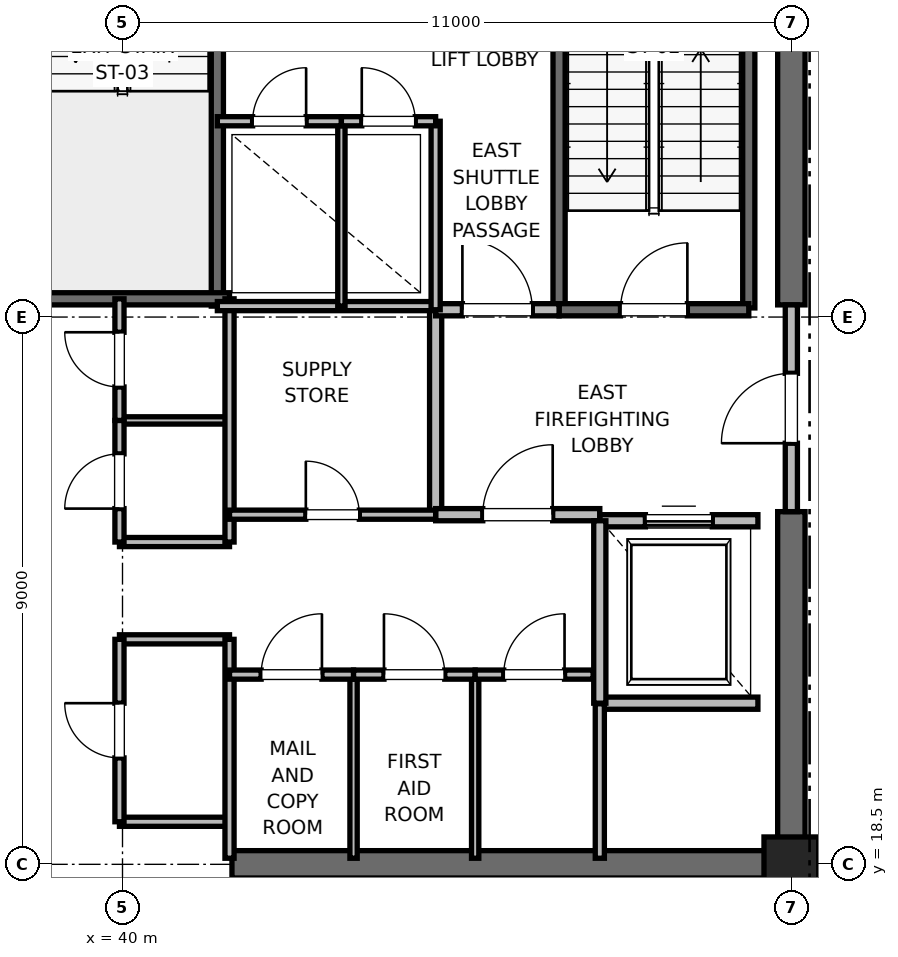
"""IFC4 building model, lengths in metres.
Left out: names, types, materials, properties, quantities, classifications, styles, units other than length and angle.
Written with IfcOpenShell. Run it as: python <this file> out.ifc"""

import sys

from ifc_helpers import new_model, si_unit, direction, frame, frame_2d, origin, origin_2d, place, context, subcontext, project, spatial, rectangle, extrude, element, fill, save


model = new_model("IFC4")
c1 = context("Model", 3, precision=1e-05, world=origin(), true_north=direction((0.0, 1.0)))
c2 = subcontext(c1, "Body", "Model", "MODEL_VIEW")
j1 = project(units=[si_unit("LENGTHUNIT", "METRE"), si_unit("PLANEANGLEUNIT", "RADIAN")], contexts=[c1])
p1 = place(None, origin())
s1 = spatial("IfcSite", under=j1, at=p1, CompositionType="ELEMENT")
p2 = place(p1, origin())
s2 = spatial("IfcBuilding", under=s1, at=p2, CompositionType="ELEMENT")
p3 = place(p2, frame((0.0, 0.0, 247.2)))
s3 = spatial("IfcBuildingStorey", under=s2, at=p3, CompositionType="ELEMENT", Elevation=247.2)
p4 = place(p3, frame((51.0, 18.5, 0.0), z_axis=(0.0, 0.0, 1.0), x_axis=(1.0, 0.0, 0.0)))
e1 = element("IfcColumn", 1, at=p4, inside=s3, PredefinedType="PILASTER", context=c2, shape_type="SweptSolid", body=[
    extrude(rectangle(XDim=0.9, YDim=0.9, at=origin_2d()), origin(), (0.0, 0.0, 1.0), 4.0),
])
p5 = place(p3, frame((41.8, 18.5, 0.0), z_axis=(0.0, 0.0, 1.0), x_axis=(1.0, 0.0, 0.0)))
e2 = element("IfcWall", 2, at=p5, inside=s3, PredefinedType="SHEAR", context=c2, shape_type="SweptSolid", body=[
    extrude(rectangle(XDim=9.2, YDim=0.45, at=frame_2d((4.6, 0.0))), origin(), (0.0, 0.0, 1.0), 3.785),
])
p6 = place(p3, frame((51.0, 18.5, 0.0), z_axis=(0.0, 0.0, 1.0), x_axis=(0.0, 1.0, 0.0)))
e3 = element("IfcWall", 3, at=p6, inside=s3, PredefinedType="SHEAR", context=c2, shape_type="SweptSolid", body=[
    extrude(rectangle(XDim=5.8, YDim=0.45, at=frame_2d((2.9, 0.0))), origin(), (0.0, 0.0, 1.0), 3.785),
])
p7 = place(p3, frame((51.0, 27.7, 0.0), z_axis=(0.0, 0.0, 1.0), x_axis=(0.0, 1.0, 0.0)))
e4 = element("IfcWall", 4, at=p7, inside=s3, PredefinedType="SHEAR", context=c2, shape_type="SweptSolid", body=[
    extrude(rectangle(XDim=8.8, YDim=0.45, at=frame_2d((4.4, 0.0))), origin(), (0.0, 0.0, 1.0), 3.785),
])
p8 = place(p3, frame((50.3, 27.65, 0.0), z_axis=(0.0, 0.0, 1.0), x_axis=(0.0, 1.0, 0.0)))
e5 = element("IfcWall", 5, at=p8, inside=s3, PredefinedType="SOLIDWALL", context=c2, shape_type="SweptSolid", body=[
    extrude(rectangle(XDim=8.15, YDim=0.2, at=frame_2d((4.075, 0.0))), origin(), (0.0, 0.0, 1.0), 3.785),
])
p9 = place(p3, frame((47.18, 27.62, 0.0), z_axis=(0.0, 0.0, 1.0), x_axis=(0.0, 1.0, 0.0)))
e6 = element("IfcWall", 6, at=p9, inside=s3, PredefinedType="SOLIDWALL", context=c2, shape_type="SweptSolid", body=[
    extrude(rectangle(XDim=8.18, YDim=0.2, at=frame_2d((4.09, 0.0))), origin(), (0.0, 0.0, 1.0), 3.785),
])
p10 = place(p3, frame((47.18, 27.62, 0.0), z_axis=(0.0, 0.0, 1.0), x_axis=(1.0, 0.0, 0.0)))
e7 = element("IfcWall", 7, at=p10, inside=s3, PredefinedType="SOLIDWALL", context=c2, shape_type="SweptSolid", body=[
    extrude(rectangle(XDim=3.12, YDim=0.2, at=frame_2d((1.56, 0.0))), origin(), (0.0, 0.0, 1.0), 3.785),
])
p11 = place(p10, frame((1.01, 0.0, 0.0)))
e8 = element("IfcOpeningElement", 8, at=p11, cuts=e7, PredefinedType="OPENING", context=c2, shape_type="SweptSolid", body=[
    extrude(rectangle(XDim=1.1, YDim=2.15, at=frame_2d((0.55, 1.075))), frame((0.0, 0.1, 0.0), z_axis=(0.0, -1.0, 0.0), x_axis=(1.0, 0.0, 0.0)), (0.0, 0.0, 1.0), 0.2),
])
p12 = place(p3, frame((41.56, 27.68, 0.0), z_axis=(0.0, 0.0, 1.0), x_axis=(0.0, 1.0, 0.0)))
e9 = element("IfcWall", 9, at=p12, inside=s3, PredefinedType="SOLIDWALL", context=c2, shape_type="SweptSolid", body=[
    extrude(rectangle(XDim=8.57, YDim=0.2, at=frame_2d((4.285, 0.0))), origin(), (0.0, 0.0, 1.0), 3.785),
])
p13 = place(p3, frame((38.44, 27.8, 0.0), z_axis=(0.0, 0.0, 1.0), x_axis=(1.0, 0.0, 0.0)))
e10 = element("IfcWall", 10, at=p13, inside=s3, PredefinedType="SOLIDWALL", context=c2, shape_type="SweptSolid", body=[
    extrude(rectangle(XDim=3.32, YDim=0.2, at=frame_2d((1.66, 0.0))), origin(), (0.0, 0.0, 1.0), 3.785),
])
p14 = place(p3, frame((45.15, 24.25, 0.0), z_axis=(0.0, 0.0, 1.0), x_axis=(0.0, 1.0, 0.0)))
e11 = element("IfcWall", 11, at=p14, inside=s3, PredefinedType="PARTITIONING", context=c2, shape_type="SweptSolid", body=[
    extrude(rectangle(XDim=3.37, YDim=0.2, at=frame_2d((1.685, 0.0))), origin(), (0.0, 0.0, 1.0), 3.785),
])
p15 = place(p3, frame((45.15, 24.25, 0.0), z_axis=(0.0, 0.0, 1.0), x_axis=(1.0, 0.0, 0.0)))
e12 = element("IfcWall", 12, at=p15, inside=s3, PredefinedType="PARTITIONING", context=c2, shape_type="SweptSolid", body=[
    extrude(rectangle(XDim=2.7, YDim=0.2, at=frame_2d((1.35, 0.0))), origin(), (0.0, 0.0, 1.0), 3.785),
])
p16 = place(p15, frame((0.775, 0.0, 0.0)))
e13 = element("IfcOpeningElement", 13, at=p16, cuts=e12, PredefinedType="OPENING", context=c2, shape_type="SweptSolid", body=[
    extrude(rectangle(XDim=1.15, YDim=2.2, at=frame_2d((0.575, 1.1))), frame((0.0, 0.1, 0.0), z_axis=(0.0, -1.0, 0.0), x_axis=(1.0, 0.0, 0.0)), (0.0, 0.0, 1.0), 0.2),
])
p17 = place(p3, frame((45.15, 27.62, 0.0), z_axis=(0.0, 0.0, 1.0), x_axis=(1.0, 0.0, 0.0)))
e14 = element("IfcWall", 14, at=p17, inside=s3, PredefinedType="PARTITIONING", context=c2, shape_type="SweptSolid", body=[
    extrude(rectangle(XDim=2.03, YDim=0.2, at=frame_2d((1.015, 0.0))), origin(), (0.0, 0.0, 1.0), 3.785),
])
p18 = place(p17, frame((0.44, 0.0, 0.0)))
e15 = element("IfcOpeningElement", 15, at=p18, cuts=e14, PredefinedType="OPENING", context=c2, shape_type="SweptSolid", body=[
    extrude(rectangle(XDim=1.15, YDim=2.2, at=frame_2d((0.575, 1.1))), frame((0.0, 0.1, 0.0), z_axis=(0.0, -1.0, 0.0), x_axis=(1.0, 0.0, 0.0)), (0.0, 0.0, 1.0), 0.2),
])
p19 = place(p3, frame((51.0, 24.3, 0.0), z_axis=(0.0, 0.0, 1.0), x_axis=(0.0, 1.0, 0.0)))
e16 = element("IfcWall", 16, at=p19, inside=s3, PredefinedType="PARTITIONING", context=c2, shape_type="SweptSolid", body=[
    extrude(rectangle(XDim=3.4, YDim=0.2, at=frame_2d((1.7, 0.0))), origin(), (0.0, 0.0, 1.0), 2.865),
])
p20 = place(p19, frame((1.125, 0.0, 0.0)))
e17 = element("IfcOpeningElement", 17, at=p20, cuts=e16, PredefinedType="OPENING", context=c2, shape_type="SweptSolid", body=[
    extrude(rectangle(XDim=1.15, YDim=2.2, at=frame_2d((0.575, 1.1))), frame((0.0, 0.1, 0.0), z_axis=(0.0, -1.0, 0.0), x_axis=(1.0, 0.0, 0.0)), (0.0, 0.0, 1.0), 0.2),
])
p21 = place(p3, frame((47.85, 21.15, 0.0), z_axis=(0.0, 0.0, 1.0), x_axis=(1.0, 0.0, 0.0)))
e18 = element("IfcWall", 18, at=p21, inside=s3, PredefinedType="SOLIDWALL", context=c2, shape_type="SweptSolid", body=[
    extrude(rectangle(XDim=2.6, YDim=0.2, at=frame_2d((1.3, 0.0))), origin(), (0.0, 0.0, 1.0), 3.785),
])
p22 = place(p3, frame((50.45, 24.15, 0.0), z_axis=(0.0, 0.0, 1.0), x_axis=(-1.0, 0.0, 0.0)))
e19 = element("IfcWall", 19, at=p22, inside=s3, PredefinedType="SOLIDWALL", context=c2, shape_type="SweptSolid", body=[
    extrude(rectangle(XDim=2.6, YDim=0.2, at=frame_2d((1.3, 0.0))), origin(), (0.0, 0.0, 1.0), 2.865),
])
p23 = place(p22, frame((0.75, 0.0, 0.0)))
e20 = element("IfcOpeningElement", 20, at=p23, cuts=e19, PredefinedType="OPENING", context=c2, shape_type="SweptSolid", body=[
    extrude(rectangle(XDim=1.1, YDim=2.2, at=frame_2d((0.55, 1.1))), frame((0.0, 0.1, 0.0), z_axis=(0.0, -1.0, 0.0), x_axis=(1.0, 0.0, 0.0)), (0.0, 0.0, 1.0), 0.2),
])
p24 = place(p3, frame((47.85, 24.15, 0.0), z_axis=(0.0, 0.0, 1.0), x_axis=(0.0, -1.0, 0.0)))
e21 = element("IfcWall", 21, at=p24, inside=s3, PredefinedType="SOLIDWALL", context=c2, shape_type="SweptSolid", body=[
    extrude(rectangle(XDim=3.0, YDim=0.2, at=frame_2d((1.5, 0.0))), origin(), (0.0, 0.0, 1.0), 3.785),
])
for number, where, z_axis, x_axis in (
    (22, (39.95, 19.2, 0.0), (0.0, 0.0, 1.0), (1.0, 0.0, 0.0)),
    (23, (39.95, 22.2, 0.0), (0.0, 0.0, 1.0), (1.0, 0.0, 0.0)),
    (24, (39.95, 23.8, 0.0), (0.0, 0.0, 1.0), (1.0, 0.0, 0.0)),
):
    element("IfcWall", number, at=place(p3, frame(where, z_axis=z_axis, x_axis=x_axis)), inside=s3, PredefinedType="PARTITIONING", context=c2, shape_type="SweptSolid", body=[
        extrude(rectangle(XDim=1.81, YDim=0.15, at=frame_2d((0.905, 0.0))), origin(), (0.0, 0.0, 1.0), 2.85),
    ])
p25 = place(p3, frame((39.95, 25.8, 0.0), z_axis=(0.0, 0.0, 1.0), x_axis=(1.0, 0.0, 0.0)))
e25 = element("IfcWall", 25, at=p25, inside=s3, PredefinedType="PARTITIONING", context=c2, shape_type="SweptSolid", body=[
    extrude(rectangle(XDim=1.81, YDim=0.12, at=frame_2d((0.905, 0.0))), origin(), (0.0, 0.0, 1.0), 2.85),
])
p26 = place(p3, frame((41.76, 18.6, 0.0), z_axis=(0.0, 0.0, 1.0), x_axis=(0.0, 1.0, 0.0)))
e26 = element("IfcWall", 26, at=p26, inside=s3, PredefinedType="PARTITIONING", context=c2, shape_type="SweptSolid", body=[
    extrude(rectangle(XDim=3.6, YDim=0.15, at=frame_2d((1.8, 0.0))), origin(), (0.0, 0.0, 1.0), 2.85),
])
p27 = place(p3, frame((41.76, 23.8, 0.0), z_axis=(0.0, 0.0, 1.0), x_axis=(0.0, 1.0, 0.0)))
e27 = element("IfcWall", 27, at=p27, inside=s3, PredefinedType="PARTITIONING", context=c2, shape_type="SweptSolid", body=[
    extrude(rectangle(XDim=4.0, YDim=0.15, at=frame_2d((2.0, 0.0))), origin(), (0.0, 0.0, 1.0), 2.85),
])
p28 = place(p3, frame((39.95, 19.2, 0.0), z_axis=(0.0, 0.0, 1.0), x_axis=(0.0, 1.0, 0.0)))
e28 = element("IfcWall", 28, at=p28, inside=s3, PredefinedType="PARTITIONING", context=c2, shape_type="SweptSolid", body=[
    extrude(rectangle(XDim=3.0, YDim=0.15, at=frame_2d((1.5, 0.0))), origin(), (0.0, 0.0, 1.0), 2.85),
])
p29 = place(p28, frame((1.05, 0.0, 0.0)))
e29 = element("IfcOpeningElement", 29, at=p29, cuts=e28, PredefinedType="OPENING", context=c2, shape_type="SweptSolid", body=[
    extrude(rectangle(XDim=0.9, YDim=2.1, at=frame_2d((0.45, 1.05))), frame((0.0, 0.075, 0.0), z_axis=(0.0, -1.0, 0.0), x_axis=(1.0, 0.0, 0.0)), (0.0, 0.0, 1.0), 0.15),
])
p30 = place(p3, frame((39.95, 23.8, 0.0), z_axis=(0.0, 0.0, 1.0), x_axis=(0.0, 1.0, 0.0)))
e30 = element("IfcWall", 30, at=p30, inside=s3, PredefinedType="PARTITIONING", context=c2, shape_type="SweptSolid", body=[
    extrude(rectangle(XDim=2.0, YDim=0.15, at=frame_2d((1.0, 0.0))), origin(), (0.0, 0.0, 1.0), 2.85),
])
p31 = place(p30, frame((0.55, 0.0, 0.0)))
e31 = element("IfcOpeningElement", 31, at=p31, cuts=e30, PredefinedType="OPENING", context=c2, shape_type="SweptSolid", body=[
    extrude(rectangle(XDim=0.9, YDim=2.1, at=frame_2d((0.45, 1.05))), frame((0.0, 0.075, 0.0), z_axis=(0.0, -1.0, 0.0), x_axis=(1.0, 0.0, 0.0)), (0.0, 0.0, 1.0), 0.15),
])
p32 = place(p3, frame((39.95, 25.8, 0.0), z_axis=(0.0, 0.0, 1.0), x_axis=(0.0, 1.0, 0.0)))
e32 = element("IfcWall", 32, at=p32, inside=s3, PredefinedType="PARTITIONING", context=c2, shape_type="SweptSolid", body=[
    extrude(rectangle(XDim=2.0, YDim=0.15, at=frame_2d((1.0, 0.0))), origin(), (0.0, 0.0, 1.0), 2.85),
])
p33 = place(p32, frame((0.55, 0.0, 0.0)))
e33 = element("IfcOpeningElement", 33, at=p33, cuts=e32, PredefinedType="OPENING", context=c2, shape_type="SweptSolid", body=[
    extrude(rectangle(XDim=0.9, YDim=2.1, at=frame_2d((0.45, 1.05))), frame((0.0, 0.075, 0.0), z_axis=(0.0, -1.0, 0.0), x_axis=(1.0, 0.0, 0.0)), (0.0, 0.0, 1.0), 0.15),
])
p34 = place(p3, frame((41.56, 27.68, 0.0), z_axis=(0.0, 0.0, 1.0), x_axis=(1.0, 0.0, 0.0)))
e34 = element("IfcWall", 34, at=p34, inside=s3, PredefinedType="PARTITIONING", context=c2, shape_type="SweptSolid", body=[
    extrude(rectangle(XDim=3.59, YDim=0.15, at=frame_2d((1.795, 0.0))), origin(), (0.0, 0.0, 1.0), 2.85),
])
p35 = place(p3, frame((47.85, 18.6, 0.0), z_axis=(0.0, 0.0, 1.0), x_axis=(0.0, 1.0, 0.0)))
e35 = element("IfcWall", 35, at=p35, inside=s3, PredefinedType="PARTITIONING", context=c2, shape_type="SweptSolid", body=[
    extrude(rectangle(XDim=2.54, YDim=0.15, at=frame_2d((1.27, 0.0))), origin(), (0.0, 0.0, 1.0), 2.85),
])
for number, where, z_axis, x_axis in (
    (36, (43.8, 18.6, 0.0), (0.0, 0.0, 1.0), (0.0, 1.0, 0.0)),
    (37, (45.8, 18.6, 0.0), (0.0, 0.0, 1.0), (0.0, 1.0, 0.0)),
):
    element("IfcWall", number, at=place(p3, frame(where, z_axis=z_axis, x_axis=x_axis)), inside=s3, PredefinedType="PARTITIONING", context=c2, shape_type="SweptSolid", body=[
        extrude(rectangle(XDim=3.02, YDim=0.12, at=frame_2d((1.51, 0.0))), origin(), (0.0, 0.0, 1.0), 2.85),
    ])
p36 = place(p3, frame((41.76, 21.62, 0.0), z_axis=(0.0, 0.0, 1.0), x_axis=(1.0, 0.0, 0.0)))
e38 = element("IfcWall", 38, at=p36, inside=s3, PredefinedType="PARTITIONING", context=c2, shape_type="SweptSolid", body=[
    extrude(rectangle(XDim=2.04, YDim=0.15, at=frame_2d((1.02, 0.0))), origin(), (0.0, 0.0, 1.0), 2.85),
])
p37 = place(p36, frame((0.52, 0.0, 0.0)))
e39 = element("IfcOpeningElement", 39, at=p37, cuts=e38, PredefinedType="OPENING", context=c2, shape_type="SweptSolid", body=[
    extrude(rectangle(XDim=1.0, YDim=2.15, at=frame_2d((0.5, 1.075))), frame((0.0, 0.075, 0.0), z_axis=(0.0, -1.0, 0.0), x_axis=(1.0, 0.0, 0.0)), (0.0, 0.0, 1.0), 0.15),
])
p38 = place(p3, frame((43.8, 21.62, 0.0), z_axis=(0.0, 0.0, 1.0), x_axis=(1.0, 0.0, 0.0)))
e40 = element("IfcWall", 40, at=p38, inside=s3, PredefinedType="PARTITIONING", context=c2, shape_type="SweptSolid", body=[
    extrude(rectangle(XDim=2.0, YDim=0.15, at=frame_2d((1.0, 0.0))), origin(), (0.0, 0.0, 1.0), 2.85),
])
p39 = place(p38, frame((0.5, 0.0, 0.0)))
e41 = element("IfcOpeningElement", 41, at=p39, cuts=e40, PredefinedType="OPENING", context=c2, shape_type="SweptSolid", body=[
    extrude(rectangle(XDim=1.0, YDim=2.15, at=frame_2d((0.5, 1.075))), frame((0.0, 0.075, 0.0), z_axis=(0.0, -1.0, 0.0), x_axis=(1.0, 0.0, 0.0)), (0.0, 0.0, 1.0), 0.15),
])
p40 = place(p3, frame((45.8, 21.62, 0.0), z_axis=(0.0, 0.0, 1.0), x_axis=(1.0, 0.0, 0.0)))
e42 = element("IfcWall", 42, at=p40, inside=s3, PredefinedType="PARTITIONING", context=c2, shape_type="SweptSolid", body=[
    extrude(rectangle(XDim=1.94, YDim=0.15, at=frame_2d((0.97, 0.0))), origin(), (0.0, 0.0, 1.0), 2.85),
])
p41 = place(p40, frame((0.47, 0.0, 0.0)))
e43 = element("IfcOpeningElement", 43, at=p41, cuts=e42, PredefinedType="OPENING", context=c2, shape_type="SweptSolid", body=[
    extrude(rectangle(XDim=1.0, YDim=2.15, at=frame_2d((0.5, 1.075))), frame((0.0, 0.075, 0.0), z_axis=(0.0, -1.0, 0.0), x_axis=(1.0, 0.0, 0.0)), (0.0, 0.0, 1.0), 0.15),
])
p42 = place(p3, frame((41.76, 24.25, 0.0), z_axis=(0.0, 0.0, 1.0), x_axis=(1.0, 0.0, 0.0)))
e44 = element("IfcWall", 44, at=p42, inside=s3, PredefinedType="PARTITIONING", context=c2, shape_type="SweptSolid", body=[
    extrude(rectangle(XDim=3.39, YDim=0.15, at=frame_2d((1.695, 0.0))), origin(), (0.0, 0.0, 1.0), 2.85),
])
p43 = place(p42, frame((1.255, 0.0, 0.0)))
e45 = element("IfcOpeningElement", 45, at=p43, cuts=e44, PredefinedType="OPENING", context=c2, shape_type="SweptSolid", body=[
    extrude(rectangle(XDim=0.88, YDim=2.1, at=frame_2d((0.44, 1.05))), frame((0.0, 0.075, 0.0), z_axis=(0.0, -1.0, 0.0), x_axis=(1.0, 0.0, 0.0)), (0.0, 0.0, 1.0), 0.15),
])
p44 = place(p3, frame((45.15, 27.62, 0.0), z_axis=(0.0, 0.0, 1.0), x_axis=(0.0, 1.0, 0.0)))
e46 = element("IfcWall", 46, at=p44, inside=s3, PredefinedType="PARTITIONING", context=c2, shape_type="SweptSolid", body=[
    extrude(rectangle(XDim=3.1, YDim=0.15, at=frame_2d((1.55, 0.0))), origin(), (0.0, 0.0, 1.0), 2.85),
])
p45 = place(p3, frame((43.6, 27.68, 0.0), z_axis=(0.0, 0.0, 1.0), x_axis=(0.0, 1.0, 0.0)))
e47 = element("IfcWall", 47, at=p45, inside=s3, PredefinedType="PARTITIONING", context=c2, shape_type="SweptSolid", body=[
    extrude(rectangle(XDim=3.04, YDim=0.12, at=frame_2d((1.52, 0.0))), origin(), (0.0, 0.0, 1.0), 2.85),
])
p46 = place(p3, frame((41.56, 30.72, 0.0), z_axis=(0.0, 0.0, 1.0), x_axis=(1.0, 0.0, 0.0)))
e48 = element("IfcWall", 48, at=p46, inside=s3, PredefinedType="PARTITIONING", context=c2, shape_type="SweptSolid", body=[
    extrude(rectangle(XDim=2.04, YDim=0.15, at=frame_2d((1.02, 0.0))), origin(), (0.0, 0.0, 1.0), 2.85),
])
p47 = place(p46, frame((0.58, 0.0, 0.0)))
e49 = element("IfcOpeningElement", 49, at=p47, cuts=e48, PredefinedType="OPENING", context=c2, shape_type="SweptSolid", body=[
    extrude(rectangle(XDim=0.88, YDim=2.1, at=frame_2d((0.44, 1.05))), frame((0.0, 0.075, 0.0), z_axis=(0.0, -1.0, 0.0), x_axis=(1.0, 0.0, 0.0)), (0.0, 0.0, 1.0), 0.15),
])
p48 = place(p3, frame((43.6, 30.72, 0.0), z_axis=(0.0, 0.0, 1.0), x_axis=(1.0, 0.0, 0.0)))
e50 = element("IfcWall", 50, at=p48, inside=s3, PredefinedType="PARTITIONING", context=c2, shape_type="SweptSolid", body=[
    extrude(rectangle(XDim=1.55, YDim=0.15, at=frame_2d((0.775, 0.0))), origin(), (0.0, 0.0, 1.0), 2.85),
])
p49 = place(p48, frame((0.335, 0.0, 0.0)))
e51 = element("IfcOpeningElement", 51, at=p49, cuts=e50, PredefinedType="OPENING", context=c2, shape_type="SweptSolid", body=[
    extrude(rectangle(XDim=0.88, YDim=2.1, at=frame_2d((0.44, 1.05))), frame((0.0, 0.075, 0.0), z_axis=(0.0, -1.0, 0.0), x_axis=(1.0, 0.0, 0.0)), (0.0, 0.0, 1.0), 0.15),
])
p50 = place(p11, origin())
e52 = element("IfcDoor", 52, at=p50, inside=s3, OperationType="SINGLE_SWING_RIGHT", PredefinedType="DOOR", context=c2, shape_type="SweptSolid", body=[
    extrude(rectangle(XDim=1.1, YDim=2.15, at=frame_2d((0.55, 1.075))), frame((0.0, 0.025, 0.0), z_axis=(0.0, -1.0, 0.0), x_axis=(1.0, 0.0, 0.0)), (0.0, 0.0, 1.0), 0.05),
])
fill(e8, e52)
p51 = place(p16, origin())
e53 = element("IfcDoor", 53, at=p51, inside=s3, OperationType="SINGLE_SWING_RIGHT", PredefinedType="DOOR", context=c2, shape_type="SweptSolid", body=[
    extrude(rectangle(XDim=1.15, YDim=2.2, at=frame_2d((0.575, 1.1))), frame((0.0, 0.025, 0.0), z_axis=(0.0, -1.0, 0.0), x_axis=(1.0, 0.0, 0.0)), (0.0, 0.0, 1.0), 0.05),
])
fill(e13, e53)
p52 = place(p18, origin())
e54 = element("IfcDoor", 54, at=p52, inside=s3, OperationType="SINGLE_SWING_LEFT", PredefinedType="DOOR", context=c2, shape_type="SweptSolid", body=[
    extrude(rectangle(XDim=1.15, YDim=2.2, at=frame_2d((0.575, 1.1))), frame((0.0, 0.025, 0.0), z_axis=(0.0, -1.0, 0.0), x_axis=(1.0, 0.0, 0.0)), (0.0, 0.0, 1.0), 0.05),
])
fill(e15, e54)
p53 = place(p20, origin())
e55 = element("IfcDoor", 55, at=p53, inside=s3, OperationType="SINGLE_SWING_LEFT", PredefinedType="DOOR", context=c2, shape_type="SweptSolid", body=[
    extrude(rectangle(XDim=1.15, YDim=2.2, at=frame_2d((0.575, 1.1))), frame((0.0, 0.025, 0.0), z_axis=(0.0, -1.0, 0.0), x_axis=(1.0, 0.0, 0.0)), (0.0, 0.0, 1.0), 0.05),
])
fill(e17, e55)
p54 = place(p23, origin())
e56 = element("IfcDoor", 56, at=p54, inside=s3, OperationType="SLIDING_TO_RIGHT", PredefinedType="DOOR", context=c2, shape_type="SweptSolid", body=[
    extrude(rectangle(XDim=1.1, YDim=2.2, at=frame_2d((0.55, 1.1))), frame((0.0, 0.025, 0.0), z_axis=(0.0, -1.0, 0.0), x_axis=(1.0, 0.0, 0.0)), (0.0, 0.0, 1.0), 0.05),
])
fill(e20, e56)
p55 = place(p29, origin())
e57 = element("IfcDoor", 57, at=p55, inside=s3, OperationType="SINGLE_SWING_RIGHT", PredefinedType="DOOR", context=c2, shape_type="SweptSolid", body=[
    extrude(rectangle(XDim=0.9, YDim=2.1, at=frame_2d((0.45, 1.05))), frame((0.0, 0.025, 0.0), z_axis=(0.0, -1.0, 0.0), x_axis=(1.0, 0.0, 0.0)), (0.0, 0.0, 1.0), 0.05),
])
fill(e29, e57)
p56 = place(p31, origin())
e58 = element("IfcDoor", 58, at=p56, inside=s3, OperationType="SINGLE_SWING_LEFT", PredefinedType="DOOR", context=c2, shape_type="SweptSolid", body=[
    extrude(rectangle(XDim=0.9, YDim=2.1, at=frame_2d((0.45, 1.05))), frame((0.0, 0.025, 0.0), z_axis=(0.0, -1.0, 0.0), x_axis=(1.0, 0.0, 0.0)), (0.0, 0.0, 1.0), 0.05),
])
fill(e31, e58)
p57 = place(p33, origin())
e59 = element("IfcDoor", 59, at=p57, inside=s3, OperationType="SINGLE_SWING_RIGHT", PredefinedType="DOOR", context=c2, shape_type="SweptSolid", body=[
    extrude(rectangle(XDim=0.9, YDim=2.1, at=frame_2d((0.45, 1.05))), frame((0.0, 0.025, 0.0), z_axis=(0.0, -1.0, 0.0), x_axis=(1.0, 0.0, 0.0)), (0.0, 0.0, 1.0), 0.05),
])
fill(e33, e59)
p58 = place(p37, origin())
e60 = element("IfcDoor", 60, at=p58, inside=s3, OperationType="SINGLE_SWING_RIGHT", PredefinedType="DOOR", context=c2, shape_type="SweptSolid", body=[
    extrude(rectangle(XDim=1.0, YDim=2.15, at=frame_2d((0.5, 1.075))), frame((0.0, 0.025, 0.0), z_axis=(0.0, -1.0, 0.0), x_axis=(1.0, 0.0, 0.0)), (0.0, 0.0, 1.0), 0.05),
])
fill(e39, e60)
p59 = place(p39, origin())
e61 = element("IfcDoor", 61, at=p59, inside=s3, OperationType="SINGLE_SWING_LEFT", PredefinedType="DOOR", context=c2, shape_type="SweptSolid", body=[
    extrude(rectangle(XDim=1.0, YDim=2.15, at=frame_2d((0.5, 1.075))), frame((0.0, 0.025, 0.0), z_axis=(0.0, -1.0, 0.0), x_axis=(1.0, 0.0, 0.0)), (0.0, 0.0, 1.0), 0.05),
])
fill(e41, e61)
p60 = place(p41, origin())
e62 = element("IfcDoor", 62, at=p60, inside=s3, OperationType="SINGLE_SWING_RIGHT", PredefinedType="DOOR", context=c2, shape_type="SweptSolid", body=[
    extrude(rectangle(XDim=1.0, YDim=2.15, at=frame_2d((0.5, 1.075))), frame((0.0, 0.025, 0.0), z_axis=(0.0, -1.0, 0.0), x_axis=(1.0, 0.0, 0.0)), (0.0, 0.0, 1.0), 0.05),
])
fill(e43, e62)
p61 = place(p43, origin())
e63 = element("IfcDoor", 63, at=p61, inside=s3, OperationType="SINGLE_SWING_LEFT", PredefinedType="DOOR", context=c2, shape_type="SweptSolid", body=[
    extrude(rectangle(XDim=0.88, YDim=2.1, at=frame_2d((0.44, 1.05))), frame((0.0, 0.025, 0.0), z_axis=(0.0, -1.0, 0.0), x_axis=(1.0, 0.0, 0.0)), (0.0, 0.0, 1.0), 0.05),
])
fill(e45, e63)
p62 = place(p47, origin())
e64 = element("IfcDoor", 64, at=p62, inside=s3, OperationType="SINGLE_SWING_RIGHT", PredefinedType="DOOR", context=c2, shape_type="SweptSolid", body=[
    extrude(rectangle(XDim=0.88, YDim=2.1, at=frame_2d((0.44, 1.05))), frame((0.0, 0.025, 0.0), z_axis=(0.0, -1.0, 0.0), x_axis=(1.0, 0.0, 0.0)), (0.0, 0.0, 1.0), 0.05),
])
fill(e49, e64)
p63 = place(p49, origin())
e65 = element("IfcDoor", 65, at=p63, inside=s3, OperationType="SINGLE_SWING_LEFT", PredefinedType="DOOR", context=c2, shape_type="SweptSolid", body=[
    extrude(rectangle(XDim=0.88, YDim=2.1, at=frame_2d((0.44, 1.05))), frame((0.0, 0.025, 0.0), z_axis=(0.0, -1.0, 0.0), x_axis=(1.0, 0.0, 0.0)), (0.0, 0.0, 1.0), 0.05),
])
fill(e51, e65)
save(model, sys.argv[1])
